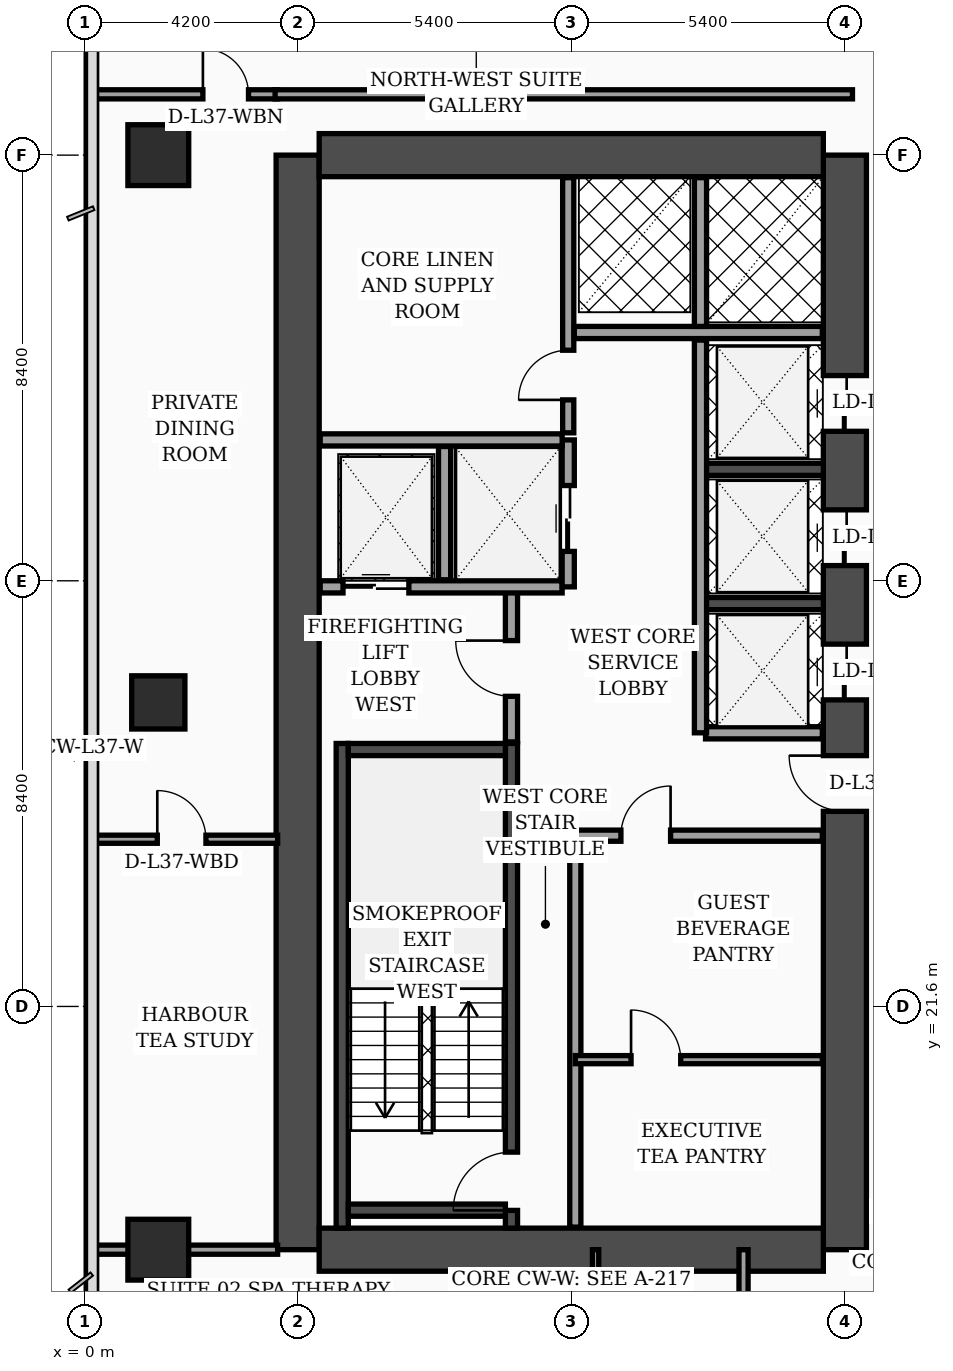
"""IFC4 building model, lengths in metres.
Left out: names, types, materials, properties, quantities, classifications, styles, units other than length and angle.
Written with IfcOpenShell. Run it as: python <this file> out.ifc"""

import sys

from ifc_helpers import new_model, si_unit, direction, frame, frame_2d, origin, origin_2d, place, context, subcontext, project, spatial, rectangle, extrude, element, fill, save


model = new_model("IFC4")
c1 = context("Model", 3, precision=1e-05, world=origin(), true_north=direction((0.0, 1.0)))
c2 = subcontext(c1, "Body", "Model", "MODEL_VIEW")
j1 = project(units=[si_unit("LENGTHUNIT", "METRE"), si_unit("PLANEANGLEUNIT", "RADIAN")], contexts=[c1])
p1 = place(None, origin())
s1 = spatial("IfcSite", under=j1, at=p1, CompositionType="ELEMENT")
p2 = place(p1, origin())
s2 = spatial("IfcBuilding", under=s1, at=p2, CompositionType="ELEMENT")
p3 = place(p2, frame((0.0, 0.0, 152.3)))
s3 = spatial("IfcBuildingStorey", under=s2, at=p3, CompositionType="ELEMENT", Elevation=152.3)
p4 = place(p3, frame((4.2, 16.8, 0.0), z_axis=(0.0, 0.0, 1.0), x_axis=(0.0, 1.0, 0.0)))
e1 = element("IfcWall", 1, at=p4, inside=s3, PredefinedType="SHEAR", context=c2, shape_type="SweptSolid", body=[
    extrude(rectangle(XDim=21.6, YDim=0.85, at=frame_2d((10.8, 0.0))), origin(), (0.0, 0.0, 1.0), 3.56),
])
p5 = place(p3, frame((15.0, 16.8, 0.0), z_axis=(0.0, 0.0, 1.0), x_axis=(0.0, 1.0, 0.0)))
e2 = element("IfcWall", 2, at=p5, inside=s3, PredefinedType="SHEAR", context=c2, shape_type="SweptSolid", body=[
    extrude(rectangle(XDim=21.6, YDim=0.85, at=frame_2d((10.8, 0.0))), origin(), (0.0, 0.0, 1.0), 3.56),
])
p6 = place(p5, frame((8.65, 0.0, 0.0)))
e3 = element("IfcOpeningElement", 3, at=p6, cuts=e2, PredefinedType="OPENING", context=c2, shape_type="SweptSolid", body=[
    extrude(rectangle(XDim=1.1, YDim=2.2, at=frame_2d((0.55, 1.1))), frame((0.0, 0.435, 0.0), z_axis=(0.0, -1.0, 0.0), x_axis=(1.0, 0.0, 0.0)), (0.0, 0.0, 1.0), 0.87),
])
p7 = place(p5, frame((10.85, 0.0, 0.0)))
e4 = element("IfcOpeningElement", 4, at=p7, cuts=e2, PredefinedType="OPENING", context=c2, shape_type="SweptSolid", body=[
    extrude(rectangle(XDim=1.1, YDim=2.2, at=frame_2d((0.55, 1.1))), frame((0.0, 0.435, 0.0), z_axis=(0.0, -1.0, 0.0), x_axis=(1.0, 0.0, 0.0)), (0.0, 0.0, 1.0), 0.87),
])
p8 = place(p5, frame((13.5, 0.0, 0.0)))
e5 = element("IfcOpeningElement", 5, at=p8, cuts=e2, PredefinedType="OPENING", context=c2, shape_type="SweptSolid", body=[
    extrude(rectangle(XDim=1.1, YDim=2.2, at=frame_2d((0.55, 1.1))), frame((0.0, 0.435, 0.0), z_axis=(0.0, -1.0, 0.0), x_axis=(1.0, 0.0, 0.0)), (0.0, 0.0, 1.0), 0.87),
])
p9 = place(p5, frame((16.15, 0.0, 0.0)))
e6 = element("IfcOpeningElement", 6, at=p9, cuts=e2, PredefinedType="OPENING", context=c2, shape_type="SweptSolid", body=[
    extrude(rectangle(XDim=1.1, YDim=2.2, at=frame_2d((0.55, 1.1))), frame((0.0, 0.435, 0.0), z_axis=(0.0, -1.0, 0.0), x_axis=(1.0, 0.0, 0.0)), (0.0, 0.0, 1.0), 0.87),
])
for number, where, z_axis, x_axis in (
    (7, (4.625, 38.4, 0.0), (0.0, 0.0, 1.0), (1.0, 0.0, 0.0)),
    (8, (4.625, 16.8, 0.0), (0.0, 0.0, 1.0), (1.0, 0.0, 0.0)),
):
    element("IfcWall", number, at=place(p3, frame(where, z_axis=z_axis, x_axis=x_axis)), inside=s3, PredefinedType="SHEAR", context=c2, shape_type="SweptSolid", body=[
        extrude(rectangle(XDim=9.95, YDim=0.85, at=frame_2d((4.975, 0.0))), origin(), (0.0, 0.0, 1.0), 3.56),
    ])
p10 = place(p3, frame((5.08, 17.225, 0.0), z_axis=(0.0, 0.0, 1.0), x_axis=(0.0, 1.0, 0.0)))
e9 = element("IfcWall", 9, at=p10, inside=s3, PredefinedType="SOLIDWALL", context=c2, shape_type="SweptSolid", body=[
    extrude(rectangle(XDim=9.565, YDim=0.24, at=frame_2d((4.782, 0.0))), origin(), (0.0, 0.0, 1.0), 3.56),
])
p11 = place(p3, frame((8.42, 17.225, 0.0), z_axis=(0.0, 0.0, 1.0), x_axis=(0.0, 1.0, 0.0)))
e10 = element("IfcWall", 10, at=p11, inside=s3, PredefinedType="SOLIDWALL", context=c2, shape_type="SweptSolid", body=[
    extrude(rectangle(XDim=9.565, YDim=0.24, at=frame_2d((4.782, 0.0))), origin(), (0.0, 0.0, 1.0), 3.56),
])
p12 = place(p11, frame((0.35, 0.0, 0.0)))
e11 = element("IfcOpeningElement", 11, at=p12, cuts=e10, PredefinedType="OPENING", context=c2, shape_type="SweptSolid", body=[
    extrude(rectangle(XDim=1.15, YDim=2.2, at=frame_2d((0.575, 1.1))), frame((0.0, 0.13, 0.0), z_axis=(0.0, -1.0, 0.0), x_axis=(1.0, 0.0, 0.0)), (0.0, 0.0, 1.0), 0.26),
])
for number, where, z_axis, x_axis in (
    (12, (5.2, 17.58, 0.0), (0.0, 0.0, 1.0), (1.0, 0.0, 0.0)),
    (13, (5.2, 26.67, 0.0), (0.0, 0.0, 1.0), (1.0, 0.0, 0.0)),
):
    element("IfcWall", number, at=place(p3, frame(where, z_axis=z_axis, x_axis=x_axis)), inside=s3, PredefinedType="SOLIDWALL", context=c2, shape_type="SweptSolid", body=[
        extrude(rectangle(XDim=3.1, YDim=0.24, at=frame_2d((1.55, 0.0))), origin(), (0.0, 0.0, 1.0), 3.56),
    ])
for number, where, z_axis, x_axis in (
    (14, (12.18, 29.55, 0.0), (0.0, 0.0, 1.0), (1.0, 0.0, 0.0)),
    (15, (12.18, 32.2, 0.0), (0.0, 0.0, 1.0), (1.0, 0.0, 0.0)),
):
    element("IfcWall", number, at=place(p3, frame(where, z_axis=z_axis, x_axis=x_axis)), inside=s3, PredefinedType="SOLIDWALL", context=c2, shape_type="SweptSolid", body=[
        extrude(rectangle(XDim=2.395, YDim=0.24, at=frame_2d((1.198, 0.0))), origin(), (0.0, 0.0, 1.0), 3.56),
    ])
p13 = place(p3, frame((1.45, 16.8, 0.0), z_axis=(0.0, 0.0, 1.0), x_axis=(1.0, 0.0, 0.0)))
e16 = element("IfcColumn", 16, at=p13, inside=s3, PredefinedType="COLUMN", context=c2, shape_type="SweptSolid", body=[
    extrude(rectangle(XDim=1.2, YDim=1.2, at=origin_2d()), origin(), (0.0, 0.0, 1.0), 3.56),
])
p14 = place(p3, frame((1.45, 27.6, 0.0), z_axis=(0.0, 0.0, 1.0), x_axis=(1.0, 0.0, 0.0)))
e17 = element("IfcColumn", 17, at=p14, inside=s3, PredefinedType="COLUMN", context=c2, shape_type="SweptSolid", body=[
    extrude(rectangle(XDim=1.05, YDim=1.05, at=origin_2d()), origin(), (0.0, 0.0, 1.0), 3.56),
])
p15 = place(p3, frame((1.45, 38.4, 0.0), z_axis=(0.0, 0.0, 1.0), x_axis=(1.0, 0.0, 0.0)))
e18 = element("IfcColumn", 18, at=p15, inside=s3, PredefinedType="COLUMN", context=c2, shape_type="SweptSolid", body=[
    extrude(rectangle(XDim=1.2, YDim=1.2, at=origin_2d()), origin(), (0.0, 0.0, 1.0), 3.56),
])
p16 = place(p3, frame((8.42, 26.82, 0.0), z_axis=(0.0, 0.0, 1.0), x_axis=(0.0, 1.0, 0.0)))
e19 = element("IfcWall", 19, at=p16, inside=s3, PredefinedType="SOLIDWALL", context=c2, shape_type="SweptSolid", body=[
    extrude(rectangle(XDim=3.0, YDim=0.24, at=frame_2d((1.5, 0.0))), origin(), (0.0, 0.0, 1.0), 3.56),
])
p17 = place(p16, frame((0.9, 0.0, 0.0)))
e20 = element("IfcOpeningElement", 20, at=p17, cuts=e19, PredefinedType="OPENING", context=c2, shape_type="SweptSolid", body=[
    extrude(rectangle(XDim=1.1, YDim=2.2, at=frame_2d((0.55, 1.1))), frame((0.0, 0.13, 0.0), z_axis=(0.0, -1.0, 0.0), x_axis=(1.0, 0.0, 0.0)), (0.0, 0.0, 1.0), 0.26),
])
p18 = place(p3, frame((4.645, 29.88, 0.0), z_axis=(0.0, 0.0, 1.0), x_axis=(1.0, 0.0, 0.0)))
e21 = element("IfcWall", 21, at=p18, inside=s3, PredefinedType="SOLIDWALL", context=c2, shape_type="SweptSolid", body=[
    extrude(rectangle(XDim=4.775, YDim=0.24, at=frame_2d((2.387, 0.0))), origin(), (0.0, 0.0, 1.0), 3.56),
])
p19 = place(p18, frame((0.45, 0.0, 0.0)))
e22 = element("IfcOpeningElement", 22, at=p19, cuts=e21, PredefinedType="OPENING", context=c2, shape_type="SweptSolid", body=[
    extrude(rectangle(XDim=1.3, YDim=2.35, at=frame_2d((0.65, 1.175))), frame((0.0, 0.13, 0.0), z_axis=(0.0, -1.0, 0.0), x_axis=(1.0, 0.0, 0.0)), (0.0, 0.0, 1.0), 0.26),
])
p20 = place(p3, frame((7.1, 30.02, 0.0), z_axis=(0.0, 0.0, 1.0), x_axis=(0.0, 1.0, 0.0)))
e23 = element("IfcWall", 23, at=p20, inside=s3, PredefinedType="SOLIDWALL", context=c2, shape_type="SweptSolid", body=[
    extrude(rectangle(XDim=2.63, YDim=0.24, at=frame_2d((1.315, 0.0))), origin(), (0.0, 0.0, 1.0), 3.56),
])
p21 = place(p3, frame((9.54, 29.88, 0.0), z_axis=(0.0, 0.0, 1.0), x_axis=(0.0, 1.0, 0.0)))
e24 = element("IfcWall", 24, at=p21, inside=s3, PredefinedType="SOLIDWALL", context=c2, shape_type="SweptSolid", body=[
    extrude(rectangle(XDim=2.9, YDim=0.24, at=frame_2d((1.45, 0.0))), origin(), (0.0, 0.0, 1.0), 3.56),
])
p22 = place(p21, frame((0.7, 0.0, 0.0)))
e25 = element("IfcOpeningElement", 25, at=p22, cuts=e24, PredefinedType="OPENING", context=c2, shape_type="SweptSolid", body=[
    extrude(rectangle(XDim=1.3, YDim=2.35, at=frame_2d((0.65, 1.175))), frame((0.0, 0.13, 0.0), z_axis=(0.0, -1.0, 0.0), x_axis=(1.0, 0.0, 0.0)), (0.0, 0.0, 1.0), 0.26),
])
p23 = place(p3, frame((4.645, 32.78, 0.0), z_axis=(0.0, 0.0, 1.0), x_axis=(1.0, 0.0, 0.0)))
e26 = element("IfcWall", 26, at=p23, inside=s3, PredefinedType="SOLIDWALL", context=c2, shape_type="SweptSolid", body=[
    extrude(rectangle(XDim=4.775, YDim=0.24, at=frame_2d((2.387, 0.0))), origin(), (0.0, 0.0, 1.0), 3.19),
])
p24 = place(p3, frame((9.68, 17.245, 0.0), z_axis=(0.0, 0.0, 1.0), x_axis=(0.0, 1.0, 0.0)))
e27 = element("IfcWall", 27, at=p24, inside=s3, PredefinedType="SOLIDWALL", context=c2, shape_type="SweptSolid", body=[
    extrude(rectangle(XDim=7.755, YDim=0.22, at=frame_2d((3.877, 0.0))), origin(), (0.0, 0.0, 1.0), 3.56),
])
p25 = place(p3, frame((9.54, 32.92, 0.0), z_axis=(0.0, 0.0, 1.0), x_axis=(0.0, 1.0, 0.0)))
e28 = element("IfcWall", 28, at=p25, inside=s3, PredefinedType="SOLIDWALL", context=c2, shape_type="SweptSolid", body=[
    extrude(rectangle(XDim=5.035, YDim=0.22, at=frame_2d((2.518, 0.0))), origin(), (0.0, 0.0, 1.0), 3.56),
])
p26 = place(p25, frame((0.65, 0.0, 0.0)))
e29 = element("IfcOpeningElement", 29, at=p26, cuts=e28, PredefinedType="OPENING", context=c2, shape_type="SweptSolid", body=[
    extrude(rectangle(XDim=0.98, YDim=2.15, at=frame_2d((0.49, 1.075))), frame((0.0, 0.12, 0.0), z_axis=(0.0, -1.0, 0.0), x_axis=(1.0, 0.0, 0.0)), (0.0, 0.0, 1.0), 0.24),
])
p27 = place(p3, frame((9.68, 20.55, 0.0), z_axis=(0.0, 0.0, 1.0), x_axis=(1.0, 0.0, 0.0)))
e30 = element("IfcWall", 30, at=p27, inside=s3, PredefinedType="PARTITIONING", context=c2, shape_type="SweptSolid", body=[
    extrude(rectangle(XDim=4.875, YDim=0.16, at=frame_2d((2.438, 0.0))), origin(), (0.0, 0.0, 1.0), 3.56),
])
p28 = place(p27, frame((1.1, 0.0, 0.0)))
e31 = element("IfcOpeningElement", 31, at=p28, cuts=e30, PredefinedType="OPENING", context=c2, shape_type="SweptSolid", body=[
    extrude(rectangle(XDim=0.98, YDim=2.15, at=frame_2d((0.49, 1.075))), frame((0.0, 0.09, 0.0), z_axis=(0.0, -1.0, 0.0), x_axis=(1.0, 0.0, 0.0)), (0.0, 0.0, 1.0), 0.18),
])
p29 = place(p3, frame((9.68, 24.97, 0.0), z_axis=(0.0, 0.0, 1.0), x_axis=(1.0, 0.0, 0.0)))
e32 = element("IfcWall", 32, at=p29, inside=s3, PredefinedType="SOLIDWALL", context=c2, shape_type="SweptSolid", body=[
    extrude(rectangle(XDim=4.875, YDim=0.22, at=frame_2d((2.438, 0.0))), origin(), (0.0, 0.0, 1.0), 2.94),
])
p30 = place(p29, frame((0.9, 0.0, 0.0)))
e33 = element("IfcOpeningElement", 33, at=p30, cuts=e32, PredefinedType="OPENING", context=c2, shape_type="SweptSolid", body=[
    extrude(rectangle(XDim=0.98, YDim=2.15, at=frame_2d((0.49, 1.075))), frame((0.0, 0.12, 0.0), z_axis=(0.0, -1.0, 0.0), x_axis=(1.0, 0.0, 0.0)), (0.0, 0.0, 1.0), 0.24),
])
p31 = place(p3, frame((12.25, 27.0, 0.0), z_axis=(0.0, 0.0, 1.0), x_axis=(1.0, 0.0, 0.0)))
e34 = element("IfcWall", 34, at=p31, inside=s3, PredefinedType="SOLIDWALL", context=c2, shape_type="SweptSolid", body=[
    extrude(rectangle(XDim=2.305, YDim=0.24, at=frame_2d((1.152, 0.0))), origin(), (0.0, 0.0, 1.0), 3.56),
])
p32 = place(p3, frame((12.15, 27.0, 0.0), z_axis=(0.0, 0.0, 1.0), x_axis=(0.0, 1.0, 0.0)))
e35 = element("IfcWall", 35, at=p32, inside=s3, PredefinedType="SOLIDWALL", context=c2, shape_type="SweptSolid", body=[
    extrude(rectangle(XDim=7.75, YDim=0.24, at=frame_2d((3.875, 0.0))), origin(), (0.0, 0.0, 1.0), 3.56),
])
p33 = place(p3, frame((9.66, 34.9, 0.0), z_axis=(0.0, 0.0, 1.0), x_axis=(1.0, 0.0, 0.0)))
e36 = element("IfcWall", 36, at=p33, inside=s3, PredefinedType="SOLIDWALL", context=c2, shape_type="SweptSolid", body=[
    extrude(rectangle(XDim=4.895, YDim=0.24, at=frame_2d((2.448, 0.0))), origin(), (0.0, 0.0, 1.0), 3.56),
])
p34 = place(p3, frame((12.15, 35.02, 0.0), z_axis=(0.0, 0.0, 1.0), x_axis=(0.0, 1.0, 0.0)))
e37 = element("IfcWall", 37, at=p34, inside=s3, PredefinedType="SOLIDWALL", context=c2, shape_type="SweptSolid", body=[
    extrude(rectangle(XDim=2.935, YDim=0.24, at=frame_2d((1.468, 0.0))), origin(), (0.0, 0.0, 1.0), 3.56),
])
p35 = place(p3, frame((0.08, 24.9, 0.0), z_axis=(0.0, 0.0, 1.0), x_axis=(1.0, 0.0, 0.0)))
e38 = element("IfcWall", 38, at=p35, inside=s3, PredefinedType="PARTITIONING", context=c2, shape_type="SweptSolid", body=[
    extrude(rectangle(XDim=3.725, YDim=0.16, at=frame_2d((1.862, 0.0))), origin(), (0.0, 0.0, 1.0), 3.04),
])
p36 = place(p35, frame((1.35, 0.0, 0.0)))
e39 = element("IfcOpeningElement", 39, at=p36, cuts=e38, PredefinedType="OPENING", context=c2, shape_type="SweptSolid", body=[
    extrude(rectangle(XDim=0.96, YDim=2.2, at=frame_2d((0.48, 1.1))), frame((0.0, 0.09, 0.0), z_axis=(0.0, -1.0, 0.0), x_axis=(1.0, 0.0, 0.0)), (0.0, 0.0, 1.0), 0.18),
])
p37 = place(p3, frame((0.08, 16.8, 0.0), z_axis=(0.0, 0.0, 1.0), x_axis=(1.0, 0.0, 0.0)))
e40 = element("IfcWall", 40, at=p37, inside=s3, PredefinedType="PARTITIONING", context=c2, shape_type="SweptSolid", body=[
    extrude(rectangle(XDim=3.725, YDim=0.18, at=frame_2d((1.862, 0.0))), origin(), (0.0, 0.0, 1.0), 2.94),
])
p38 = place(p3, frame((0.08, 39.6, 0.0), z_axis=(0.0, 0.0, 1.0), x_axis=(1.0, 0.0, 0.0)))
e41 = element("IfcWall", 41, at=p38, inside=s3, PredefinedType="PARTITIONING", context=c2, shape_type="SweptSolid", body=[
    extrude(rectangle(XDim=3.725, YDim=0.18, at=frame_2d((1.862, 0.0))), origin(), (0.0, 0.0, 1.0), 2.94),
])
p39 = place(p38, frame((2.25, 0.0, 0.0)))
e42 = element("IfcOpeningElement", 42, at=p39, cuts=e41, PredefinedType="OPENING", context=c2, shape_type="SweptSolid", body=[
    extrude(rectangle(XDim=0.9, YDim=2.15, at=frame_2d((0.45, 1.075))), frame((0.0, 0.1, 0.0), z_axis=(0.0, -1.0, 0.0), x_axis=(1.0, 0.0, 0.0)), (0.0, 0.0, 1.0), 0.2),
])
p40 = place(p3, frame((10.08, 14.67, 0.0), z_axis=(0.0, 0.0, 1.0), x_axis=(0.0, 1.0, 0.0)))
e43 = element("IfcWall", 43, at=p40, inside=s3, PredefinedType="PARTITIONING", context=c2, shape_type="SweptSolid", body=[
    extrude(rectangle(XDim=2.13, YDim=0.125, at=frame_2d((1.065, 0.0))), origin(), (0.0, 0.0, 1.0), 3.56),
])
p41 = place(p3, frame((13.0, 2.44, 0.0), z_axis=(0.0, 0.0, 1.0), x_axis=(0.0, 1.0, 0.0)))
e44 = element("IfcWall", 44, at=p41, inside=s3, PredefinedType="PARTITIONING", context=c2, shape_type="SweptSolid", body=[
    extrude(rectangle(XDim=14.36, YDim=0.18, at=frame_2d((7.18, 0.0))), origin(), (0.0, 0.0, 1.0), 2.94),
])
p42 = place(p41, frame((3.01, 0.0, 0.0)))
e45 = element("IfcOpeningElement", 45, at=p42, cuts=e44, PredefinedType="OPENING", context=c2, shape_type="SweptSolid", body=[
    extrude(rectangle(XDim=1.02, YDim=2.2, at=frame_2d((0.51, 1.1))), frame((0.0, 0.1, 0.0), z_axis=(0.0, -1.0, 0.0), x_axis=(1.0, 0.0, 0.0)), (0.0, 0.0, 1.0), 0.2),
])
p43 = place(p41, frame((8.94, 0.0, 0.0)))
e46 = element("IfcOpeningElement", 46, at=p43, cuts=e44, PredefinedType="OPENING", context=c2, shape_type="SweptSolid", body=[
    extrude(rectangle(XDim=1.02, YDim=2.2, at=frame_2d((0.51, 1.1))), frame((0.0, 0.1, 0.0), z_axis=(0.0, -1.0, 0.0), x_axis=(1.0, 0.0, 0.0)), (0.0, 0.0, 1.0), 0.2),
])
p44 = place(p3, frame((3.755, 39.6, 0.0), z_axis=(0.0, 0.0, 1.0), x_axis=(1.0, 0.0, 0.0)))
e47 = element("IfcWall", 47, at=p44, inside=s3, PredefinedType="PARTITIONING", context=c2, shape_type="SweptSolid", body=[
    extrude(rectangle(XDim=11.395, YDim=0.18, at=frame_2d((5.698, 0.0))), origin(), (0.0, 0.0, 1.0), 2.94),
])
p45 = place(p17, origin())
e48 = element("IfcDoor", 48, at=p45, inside=s3, OperationType="SINGLE_SWING_RIGHT", PredefinedType="DOOR", context=c2, shape_type="SweptSolid", body=[
    extrude(rectangle(XDim=1.1, YDim=2.2, at=frame_2d((0.55, 1.1))), frame((0.0, 0.025, 0.0), z_axis=(0.0, -1.0, 0.0), x_axis=(1.0, 0.0, 0.0)), (0.0, 0.0, 1.0), 0.05),
])
fill(e20, e48)
p46 = place(p19, origin())
e49 = element("IfcDoor", 49, at=p46, inside=s3, OperationType="DOUBLE_DOOR_SLIDING", PredefinedType="DOOR", context=c2, shape_type="SweptSolid", body=[
    extrude(rectangle(XDim=1.3, YDim=2.35, at=frame_2d((0.65, 1.175))), frame((0.0, 0.025, 0.0), z_axis=(0.0, -1.0, 0.0), x_axis=(1.0, 0.0, 0.0)), (0.0, 0.0, 1.0), 0.05),
])
fill(e22, e49)
p47 = place(p22, origin())
e50 = element("IfcDoor", 50, at=p47, inside=s3, OperationType="DOUBLE_DOOR_SLIDING", PredefinedType="DOOR", context=c2, shape_type="SweptSolid", body=[
    extrude(rectangle(XDim=1.3, YDim=2.35, at=frame_2d((0.65, 1.175))), frame((0.0, 0.025, 0.0), z_axis=(0.0, -1.0, 0.0), x_axis=(1.0, 0.0, 0.0)), (0.0, 0.0, 1.0), 0.05),
])
fill(e25, e50)
p48 = place(p26, origin())
e51 = element("IfcDoor", 51, at=p48, inside=s3, OperationType="SINGLE_SWING_LEFT", PredefinedType="DOOR", context=c2, shape_type="SweptSolid", body=[
    extrude(rectangle(XDim=0.98, YDim=2.15, at=frame_2d((0.49, 1.075))), frame((0.0, 0.025, 0.0), z_axis=(0.0, -1.0, 0.0), x_axis=(1.0, 0.0, 0.0)), (0.0, 0.0, 1.0), 0.05),
])
fill(e29, e51)
p49 = place(p28, origin())
e52 = element("IfcDoor", 52, at=p49, inside=s3, OperationType="SINGLE_SWING_LEFT", PredefinedType="DOOR", context=c2, shape_type="SweptSolid", body=[
    extrude(rectangle(XDim=0.98, YDim=2.15, at=frame_2d((0.49, 1.075))), frame((0.0, 0.025, 0.0), z_axis=(0.0, -1.0, 0.0), x_axis=(1.0, 0.0, 0.0)), (0.0, 0.0, 1.0), 0.05),
])
fill(e31, e52)
p50 = place(p30, origin())
e53 = element("IfcDoor", 53, at=p50, inside=s3, OperationType="SINGLE_SWING_RIGHT", PredefinedType="DOOR", context=c2, shape_type="SweptSolid", body=[
    extrude(rectangle(XDim=0.98, YDim=2.15, at=frame_2d((0.49, 1.075))), frame((0.0, 0.025, 0.0), z_axis=(0.0, -1.0, 0.0), x_axis=(1.0, 0.0, 0.0)), (0.0, 0.0, 1.0), 0.05),
])
fill(e33, e53)
p51 = place(p36, origin())
e54 = element("IfcDoor", 54, at=p51, inside=s3, OperationType="SINGLE_SWING_LEFT", PredefinedType="DOOR", context=c2, shape_type="SweptSolid", body=[
    extrude(rectangle(XDim=0.96, YDim=2.2, at=frame_2d((0.48, 1.1))), frame((0.0, 0.025, 0.0), z_axis=(0.0, -1.0, 0.0), x_axis=(1.0, 0.0, 0.0)), (0.0, 0.0, 1.0), 0.05),
])
fill(e39, e54)
p52 = place(p39, origin())
e55 = element("IfcDoor", 55, at=p52, inside=s3, OperationType="SINGLE_SWING_LEFT", PredefinedType="DOOR", context=c2, shape_type="SweptSolid", body=[
    extrude(rectangle(XDim=0.9, YDim=2.15, at=frame_2d((0.45, 1.075))), frame((0.0, 0.025, 0.0), z_axis=(0.0, -1.0, 0.0), x_axis=(1.0, 0.0, 0.0)), (0.0, 0.0, 1.0), 0.05),
])
fill(e42, e55)
p53 = place(p12, origin())
e56 = element("IfcDoor", 56, at=p53, inside=s3, OperationType="SINGLE_SWING_LEFT", PredefinedType="DOOR", context=c2, shape_type="SweptSolid", body=[
    extrude(rectangle(XDim=1.15, YDim=2.2, at=frame_2d((0.575, 1.1))), frame((0.0, 0.025, 0.0), z_axis=(0.0, -1.0, 0.0), x_axis=(1.0, 0.0, 0.0)), (0.0, 0.0, 1.0), 0.05),
])
fill(e11, e56)
p54 = place(p6, origin())
e57 = element("IfcDoor", 57, at=p54, inside=s3, OperationType="SINGLE_SWING_RIGHT", PredefinedType="DOOR", context=c2, shape_type="SweptSolid", body=[
    extrude(rectangle(XDim=1.1, YDim=2.2, at=frame_2d((0.55, 1.1))), frame((0.0, 0.025, 0.0), z_axis=(0.0, -1.0, 0.0), x_axis=(1.0, 0.0, 0.0)), (0.0, 0.0, 1.0), 0.05),
])
fill(e3, e57)
p55 = place(p7, origin())
e58 = element("IfcDoor", 58, at=p55, inside=s3, OperationType="DOUBLE_DOOR_SLIDING", PredefinedType="DOOR", context=c2, shape_type="SweptSolid", body=[
    extrude(rectangle(XDim=1.1, YDim=2.2, at=frame_2d((0.55, 1.1))), frame((0.0, 0.025, 0.0), z_axis=(0.0, -1.0, 0.0), x_axis=(1.0, 0.0, 0.0)), (0.0, 0.0, 1.0), 0.05),
])
fill(e4, e58)
p56 = place(p8, origin())
e59 = element("IfcDoor", 59, at=p56, inside=s3, OperationType="DOUBLE_DOOR_SLIDING", PredefinedType="DOOR", context=c2, shape_type="SweptSolid", body=[
    extrude(rectangle(XDim=1.1, YDim=2.2, at=frame_2d((0.55, 1.1))), frame((0.0, 0.025, 0.0), z_axis=(0.0, -1.0, 0.0), x_axis=(1.0, 0.0, 0.0)), (0.0, 0.0, 1.0), 0.05),
])
fill(e5, e59)
p57 = place(p9, origin())
e60 = element("IfcDoor", 60, at=p57, inside=s3, OperationType="DOUBLE_DOOR_SLIDING", PredefinedType="DOOR", context=c2, shape_type="SweptSolid", body=[
    extrude(rectangle(XDim=1.1, YDim=2.2, at=frame_2d((0.55, 1.1))), frame((0.0, 0.025, 0.0), z_axis=(0.0, -1.0, 0.0), x_axis=(1.0, 0.0, 0.0)), (0.0, 0.0, 1.0), 0.05),
])
fill(e6, e60)
save(model, sys.argv[1])
